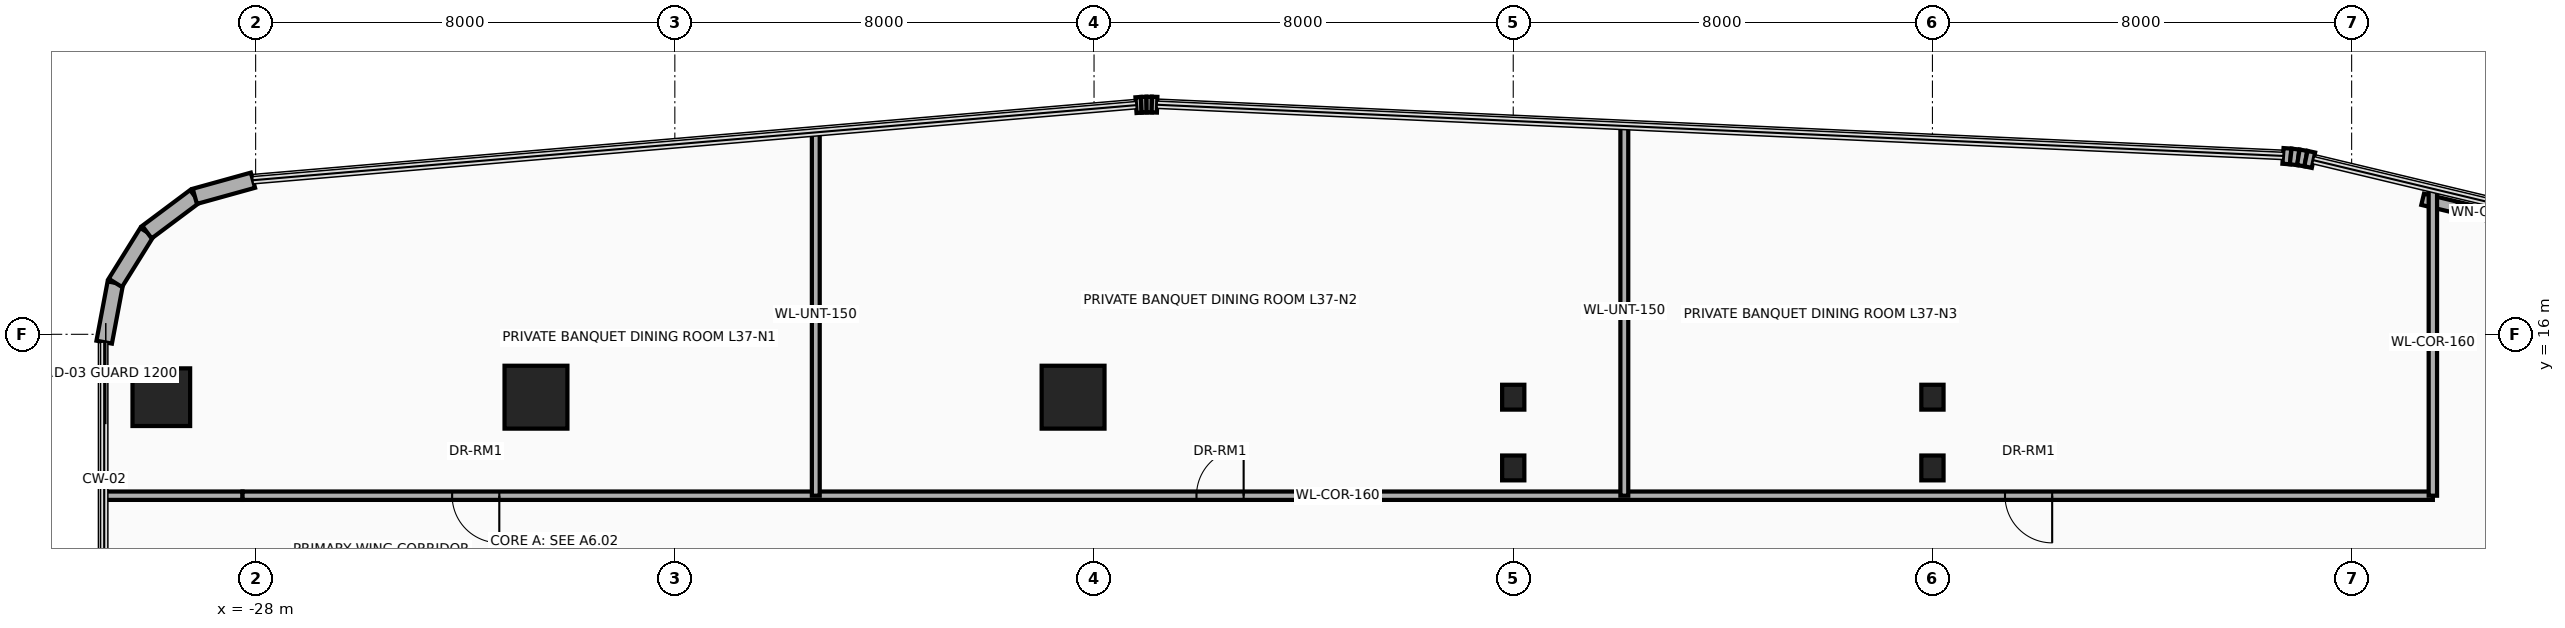
"""IFC4 building model, lengths in metres.
Left out: names, types, materials, properties, quantities, classifications, styles, units other than length and angle.
Written with IfcOpenShell. Run it as: python <this file> out.ifc"""

import sys

from ifc_helpers import new_model, si_unit, direction, frame, frame_2d, origin, origin_2d, place, context, subcontext, project, spatial, rectangle, circle, i_section, extrude, source, transform, mapped, element, fill, save


model = new_model("IFC4")
c1 = context("Model", 3, precision=1e-05, world=origin(), true_north=direction((0.0, 1.0)))
c2 = subcontext(c1, "Body", "Model", "MODEL_VIEW")
j1 = project(units=[si_unit("LENGTHUNIT", "METRE"), si_unit("PLANEANGLEUNIT", "RADIAN")], contexts=[c1])
p1 = place(None, origin())
s1 = spatial("IfcSite", under=j1, at=p1, CompositionType="ELEMENT")
p2 = place(p1, origin())
s2 = spatial("IfcBuilding", under=s1, at=p2, CompositionType="ELEMENT")
p3 = place(p2, frame((0.0, 0.0, 146.4)))
s3 = spatial("IfcBuildingStorey", under=s2, at=p3, CompositionType="ELEMENT", Elevation=146.4)
m1 = source(origin(), c2, "Body", "SweptSolid", [
    extrude(circle(Radius=0.55, at=origin_2d()), origin(), (0.0, 0.0, 1.0), 3.7),
])
p4 = place(p3, frame((-29.8, 14.8, 0.0), z_axis=(0.0, 0.0, 1.0), x_axis=(1.0, 0.0, 0.0)))
e1 = element("IfcColumn", 1, at=p4, inside=s3, PredefinedType="COLUMN", context=c2, shape_type="MappedRepresentation", body=[
    mapped(m1, transform((0.0, 0.0, 0.0), x_axis=(1.0, 0.0, 0.0), y_axis=(0.0, 1.0, 0.0), z_axis=(0.0, 0.0, 1.0), scale=1.0)),
])
m2 = source(origin(), c2, "Body", "SweptSolid", [
    extrude(rectangle(XDim=1.2, YDim=1.2, at=origin_2d()), origin(), (0.0, 0.0, 1.0), 3.7),
])
for number, where, z_axis, x_axis in (
    (2, (-22.65, 14.8, 0.0), (0.0, 0.0, 1.0), (1.0, 0.0, 0.0)),
    (3, (-12.4, 14.8, 0.0), (0.0, 0.0, 1.0), (1.0, 0.0, 0.0)),
):
    element("IfcColumn", number, at=place(p3, frame(where, z_axis=z_axis, x_axis=x_axis)), inside=s3, PredefinedType="COLUMN", context=c2, shape_type="MappedRepresentation", body=[
        mapped(m2, transform((0.0, 0.0, 0.0), x_axis=(1.0, 0.0, 0.0), y_axis=(0.0, 1.0, 0.0), z_axis=(0.0, 0.0, 1.0), scale=1.0)),
    ])
m3 = source(origin(), c2, "Body", "SweptSolid", [
    extrude(i_section(OverallWidth=0.424, OverallDepth=0.474, WebThickness=0.048, FlangeThickness=0.077, at=origin_2d()), origin(), (0.0, 0.0, 1.0), 3.7),
])
for number, where, z_axis, x_axis in (
    (4, (-4.0, 13.45, 0.0), (0.0, 0.0, 1.0), (1.0, 0.0, 0.0)),
    (5, (-4.0, 14.8, 0.0), (0.0, 0.0, 1.0), (1.0, 0.0, 0.0)),
    (6, (4.0, 13.45, 0.0), (0.0, 0.0, 1.0), (1.0, 0.0, 0.0)),
    (7, (4.0, 14.8, 0.0), (0.0, 0.0, 1.0), (1.0, 0.0, 0.0)),
):
    element("IfcColumn", number, at=place(p3, frame(where, z_axis=z_axis, x_axis=x_axis)), inside=s3, PredefinedType="COLUMN", context=c2, shape_type="MappedRepresentation", body=[
        mapped(m3, transform((0.0, 0.0, 0.0), x_axis=(1.0, 0.0, 0.0), y_axis=(0.0, 1.0, 0.0), z_axis=(0.0, 0.0, 1.0), scale=1.0)),
    ])
p5 = place(p3, frame((-30.89, 15.85, 0.0), z_axis=(0.0, 0.0, 1.0), x_axis=(0.184557499391, 0.982821718023, 0.0)))
e8 = element("IfcWall", 8, at=p5, inside=s3, PredefinedType="SOLIDWALL", context=c2, shape_type="SweptSolid", body=[
    extrude(rectangle(XDim=1.151, YDim=0.3, at=frame_2d((0.575, 0.0))), origin(), (0.0, 0.0, 1.0), 3.46),
])
p6 = place(p3, frame((-30.677, 16.981, 0.0), z_axis=(0.0, 0.0, 1.0), x_axis=(0.52880576008, 0.848742875143, 0.0)))
e9 = element("IfcWall", 9, at=p6, inside=s3, PredefinedType="SOLIDWALL", context=c2, shape_type="SweptSolid", body=[
    extrude(rectangle(XDim=1.141, YDim=0.3, at=frame_2d((0.57, 0.0))), origin(), (0.0, 0.0, 1.0), 3.46),
])
p7 = place(p3, frame((-30.074, 17.95, 0.0), z_axis=(0.0, 0.0, 1.0), x_axis=(0.800975009324, 0.598697782223, 0.0)))
e10 = element("IfcWall", 10, at=p7, inside=s3, PredefinedType="SOLIDWALL", context=c2, shape_type="SweptSolid", body=[
    extrude(rectangle(XDim=1.141, YDim=0.3, at=frame_2d((0.57, 0.0))), origin(), (0.0, 0.0, 1.0), 3.46),
])
p8 = place(p3, frame((-29.161, 18.633, 0.0), z_axis=(0.0, 0.0, 1.0), x_axis=(0.963624193367, 0.267260947313, 0.0)))
e11 = element("IfcWall", 11, at=p8, inside=s3, PredefinedType="SOLIDWALL", context=c2, shape_type="SweptSolid", body=[
    extrude(rectangle(XDim=1.151, YDim=0.3, at=frame_2d((0.575, 0.0))), origin(), (0.0, 0.0, 1.0), 3.46),
])
p9 = place(p3, frame((-11.199, 20.373, 0.0), z_axis=(0.0, 0.0, 1.0), x_axis=(0.997567332166, 0.069709524416, 0.0)))
e12 = element("IfcWall", 12, at=p9, inside=s3, PredefinedType="SOLIDWALL", context=c2, shape_type="SweptSolid", body=[
    extrude(rectangle(XDim=0.102, YDim=0.3, at=frame_2d((0.051, 0.0))), origin(), (0.0, 0.0, 1.0), 3.46),
])
p10 = place(p3, frame((-11.098, 20.38, 0.0), z_axis=(0.0, 0.0, 1.0), x_axis=(0.999334672785, 0.03647206835, 0.0)))
e13 = element("IfcWall", 13, at=p10, inside=s3, PredefinedType="SOLIDWALL", context=c2, shape_type="SweptSolid", body=[
    extrude(rectangle(XDim=0.1, YDim=0.3, at=frame_2d((0.05, 0.0))), origin(), (0.0, 0.0, 1.0), 3.46),
])
p11 = place(p3, frame((-10.998, 20.383, 0.0), z_axis=(0.0, 0.0, 1.0), x_axis=(0.999997054401, 0.002427177317, 0.0)))
e14 = element("IfcWall", 14, at=p11, inside=s3, PredefinedType="SOLIDWALL", context=c2, shape_type="SweptSolid", body=[
    extrude(rectangle(XDim=0.101, YDim=0.3, at=frame_2d((0.05, 0.0))), origin(), (0.0, 0.0, 1.0), 3.46),
])
p12 = place(p3, frame((-10.897, 20.384, 0.0), z_axis=(0.0, 0.0, 1.0), x_axis=(0.999584209171, -0.02883415988, 0.0)))
e15 = element("IfcWall", 15, at=p12, inside=s3, PredefinedType="SOLIDWALL", context=c2, shape_type="SweptSolid", body=[
    extrude(rectangle(XDim=0.102, YDim=0.3, at=frame_2d((0.051, 0.0))), origin(), (0.0, 0.0, 1.0), 3.46),
])
p13 = place(p3, frame((10.69, 19.404, 0.0), z_axis=(0.0, 0.0, 1.0), x_axis=(0.99758310784, -0.069483400546, 0.0)))
e16 = element("IfcWall", 16, at=p13, inside=s3, PredefinedType="SOLIDWALL", context=c2, shape_type="SweptSolid", body=[
    extrude(rectangle(XDim=0.147, YDim=0.3, at=frame_2d((0.074, 0.0))), origin(), (0.0, 0.0, 1.0), 3.46),
])
for number, where, z_axis, x_axis in (
    (17, (10.837, 19.394, 0.0), (0.0, 0.0, 1.0), (0.993, -0.117, 0.0)),
    (18, (10.983, 19.377, 0.0), (0.0, 0.0, 1.0), (0.987, -0.163, 0.0)),
):
    element("IfcWall", number, at=place(p3, frame(where, z_axis=z_axis, x_axis=x_axis)), inside=s3, PredefinedType="SOLIDWALL", context=c2, shape_type="SweptSolid", body=[
        extrude(rectangle(XDim=0.146, YDim=0.3, at=frame_2d((0.073, 0.0))), origin(), (0.0, 0.0, 1.0), 3.46),
    ])
p14 = place(p3, frame((11.127, 19.353, 0.0), z_axis=(0.0, 0.0, 1.0), x_axis=(0.978019841688, -0.208511844421, 0.0)))
e19 = element("IfcWall", 19, at=p14, inside=s3, PredefinedType="SOLIDWALL", context=c2, shape_type="SweptSolid", body=[
    extrude(rectangle(XDim=0.147, YDim=0.3, at=frame_2d((0.074, 0.0))), origin(), (0.0, 0.0, 1.0), 3.46),
])
p15 = place(p3, frame((13.355, 18.576, 0.0), z_axis=(0.0, 0.0, 1.0), x_axis=(0.97252211384, -0.232810519721, 0.0)))
e20 = element("IfcWall", 20, at=p15, inside=s3, PredefinedType="SOLIDWALL", context=c2, shape_type="SweptSolid", body=[
    extrude(rectangle(XDim=2.2, YDim=0.22, at=frame_2d((1.1, 0.0))), origin(), (0.0, 0.0, 1.0), 3.46),
])
p16 = place(p15, frame((0.65, 0.0, 0.95)))
e21 = element("IfcOpeningElement", 21, at=p16, cuts=e20, PredefinedType="OPENING", context=c2, shape_type="SweptSolid", body=[
    extrude(rectangle(XDim=0.9, YDim=1.3, at=frame_2d((0.45, 0.65))), frame((0.0, 0.125, 0.0), z_axis=(0.0, -1.0, 0.0), x_axis=(1.0, 0.0, 0.0)), (0.0, 0.0, 1.0), 0.25),
])
p17 = place(p3, frame((-30.89, 12.92, 0.0), z_axis=(0.0, 0.0, 1.0), x_axis=(1.0, 0.0, 0.0)))
e22 = element("IfcWall", 22, at=p17, inside=s3, PredefinedType="PARTITIONING", context=c2, shape_type="SweptSolid", body=[
    extrude(rectangle(XDim=2.64, YDim=0.16, at=frame_2d((1.32, 0.0))), origin(), (0.0, 0.0, 1.0), 2.896),
])
p18 = place(p3, frame((-28.25, 12.92, 0.0), z_axis=(0.0, 0.0, 1.0), x_axis=(1.0, 0.0, 0.0)))
e23 = element("IfcWall", 23, at=p18, inside=s3, PredefinedType="PARTITIONING", context=c2, shape_type="SweptSolid", body=[
    extrude(rectangle(XDim=41.8, YDim=0.16, at=frame_2d((20.9, 0.0))), origin(), (0.0, 0.0, 1.0), 2.666),
])
p19 = place(p18, frame((4.0, 0.0, 0.0)))
e24 = element("IfcOpeningElement", 24, at=p19, cuts=e23, PredefinedType="OPENING", context=c2, shape_type="SweptSolid", body=[
    extrude(rectangle(XDim=0.9, YDim=2.1, at=frame_2d((0.45, 1.05))), frame((0.0, 0.095, 0.0), z_axis=(0.0, -1.0, 0.0), x_axis=(1.0, 0.0, 0.0)), (0.0, 0.0, 1.0), 0.19),
])
p20 = place(p18, frame((18.205, 0.0, 0.0)))
e25 = element("IfcOpeningElement", 25, at=p20, cuts=e23, PredefinedType="OPENING", context=c2, shape_type="SweptSolid", body=[
    extrude(rectangle(XDim=0.9, YDim=2.1, at=frame_2d((0.45, 1.05))), frame((0.0, 0.095, 0.0), z_axis=(0.0, -1.0, 0.0), x_axis=(1.0, 0.0, 0.0)), (0.0, 0.0, 1.0), 0.19),
])
p21 = place(p18, frame((33.635, 0.0, 0.0)))
e26 = element("IfcOpeningElement", 26, at=p21, cuts=e23, PredefinedType="OPENING", context=c2, shape_type="SweptSolid", body=[
    extrude(rectangle(XDim=0.9, YDim=2.1, at=frame_2d((0.45, 1.05))), frame((0.0, 0.095, 0.0), z_axis=(0.0, -1.0, 0.0), x_axis=(1.0, 0.0, 0.0)), (0.0, 0.0, 1.0), 0.19),
])
p22 = place(p3, frame((13.55, 12.92, 0.0), z_axis=(0.0, 0.0, 1.0), x_axis=(0.0, 1.0, 0.0)))
e27 = element("IfcWall", 27, at=p22, inside=s3, PredefinedType="PARTITIONING", context=c2, shape_type="SweptSolid", body=[
    extrude(rectangle(XDim=5.857, YDim=0.16, at=frame_2d((2.928, 0.0))), origin(), (0.0, 0.0, 1.0), 2.666),
])
p23 = place(p3, frame((-17.31, 12.92, 0.0), z_axis=(0.0, 0.0, 1.0), x_axis=(0.0, 1.0, 0.0)))
e28 = element("IfcWall", 28, at=p23, inside=s3, PredefinedType="PARTITIONING", context=c2, shape_type="SweptSolid", body=[
    extrude(rectangle(XDim=6.933, YDim=0.15, at=frame_2d((3.467, 0.0))), origin(), (0.0, 0.0, 1.0), 2.666),
])
p24 = place(p3, frame((-1.88, 12.92, 0.0), z_axis=(0.0, 0.0, 1.0), x_axis=(0.0, 1.0, 0.0)))
e29 = element("IfcWall", 29, at=p24, inside=s3, PredefinedType="PARTITIONING", context=c2, shape_type="SweptSolid", body=[
    extrude(rectangle(XDim=7.055, YDim=0.15, at=frame_2d((3.528, 0.0))), origin(), (0.0, 0.0, 1.0), 2.666),
])
p25 = place(p16, origin())
e30 = element("IfcWindow", 30, at=p25, inside=s3, PartitioningType="SINGLE_PANEL", PredefinedType="WINDOW", context=c2, shape_type="SweptSolid", body=[
    extrude(rectangle(XDim=0.9, YDim=1.3, at=frame_2d((0.45, 0.65))), frame((0.0, 0.03, 0.0), z_axis=(0.0, -1.0, 0.0), x_axis=(1.0, 0.0, 0.0)), (0.0, 0.0, 1.0), 0.06),
])
fill(e21, e30)
p26 = place(p19, frame((0.9, 0.0, 0.0), z_axis=(0.0, 0.0, 1.0), x_axis=(-1.0, 0.0, 0.0)))
e31 = element("IfcDoor", 31, at=p26, inside=s3, OperationType="SINGLE_SWING_LEFT", PredefinedType="DOOR", context=c2, shape_type="SweptSolid", body=[
    extrude(rectangle(XDim=0.9, YDim=2.1, at=frame_2d((0.45, 1.05))), frame((0.0, 0.025, 0.0), z_axis=(0.0, -1.0, 0.0), x_axis=(1.0, 0.0, 0.0)), (0.0, 0.0, 1.0), 0.05),
])
fill(e24, e31)
p27 = place(p20, origin())
e32 = element("IfcDoor", 32, at=p27, inside=s3, OperationType="SINGLE_SWING_RIGHT", PredefinedType="DOOR", context=c2, shape_type="SweptSolid", body=[
    extrude(rectangle(XDim=0.9, YDim=2.1, at=frame_2d((0.45, 1.05))), frame((0.0, 0.025, 0.0), z_axis=(0.0, -1.0, 0.0), x_axis=(1.0, 0.0, 0.0)), (0.0, 0.0, 1.0), 0.05),
])
fill(e25, e32)
p28 = place(p21, frame((0.9, 0.0, 0.0), z_axis=(0.0, 0.0, 1.0), x_axis=(-1.0, 0.0, 0.0)))
e33 = element("IfcDoor", 33, at=p28, inside=s3, OperationType="SINGLE_SWING_LEFT", PredefinedType="DOOR", context=c2, shape_type="SweptSolid", body=[
    extrude(rectangle(XDim=0.9, YDim=2.1, at=frame_2d((0.45, 1.05))), frame((0.0, 0.025, 0.0), z_axis=(0.0, -1.0, 0.0), x_axis=(1.0, 0.0, 0.0)), (0.0, 0.0, 1.0), 0.05),
])
fill(e26, e33)
save(model, sys.argv[1])
